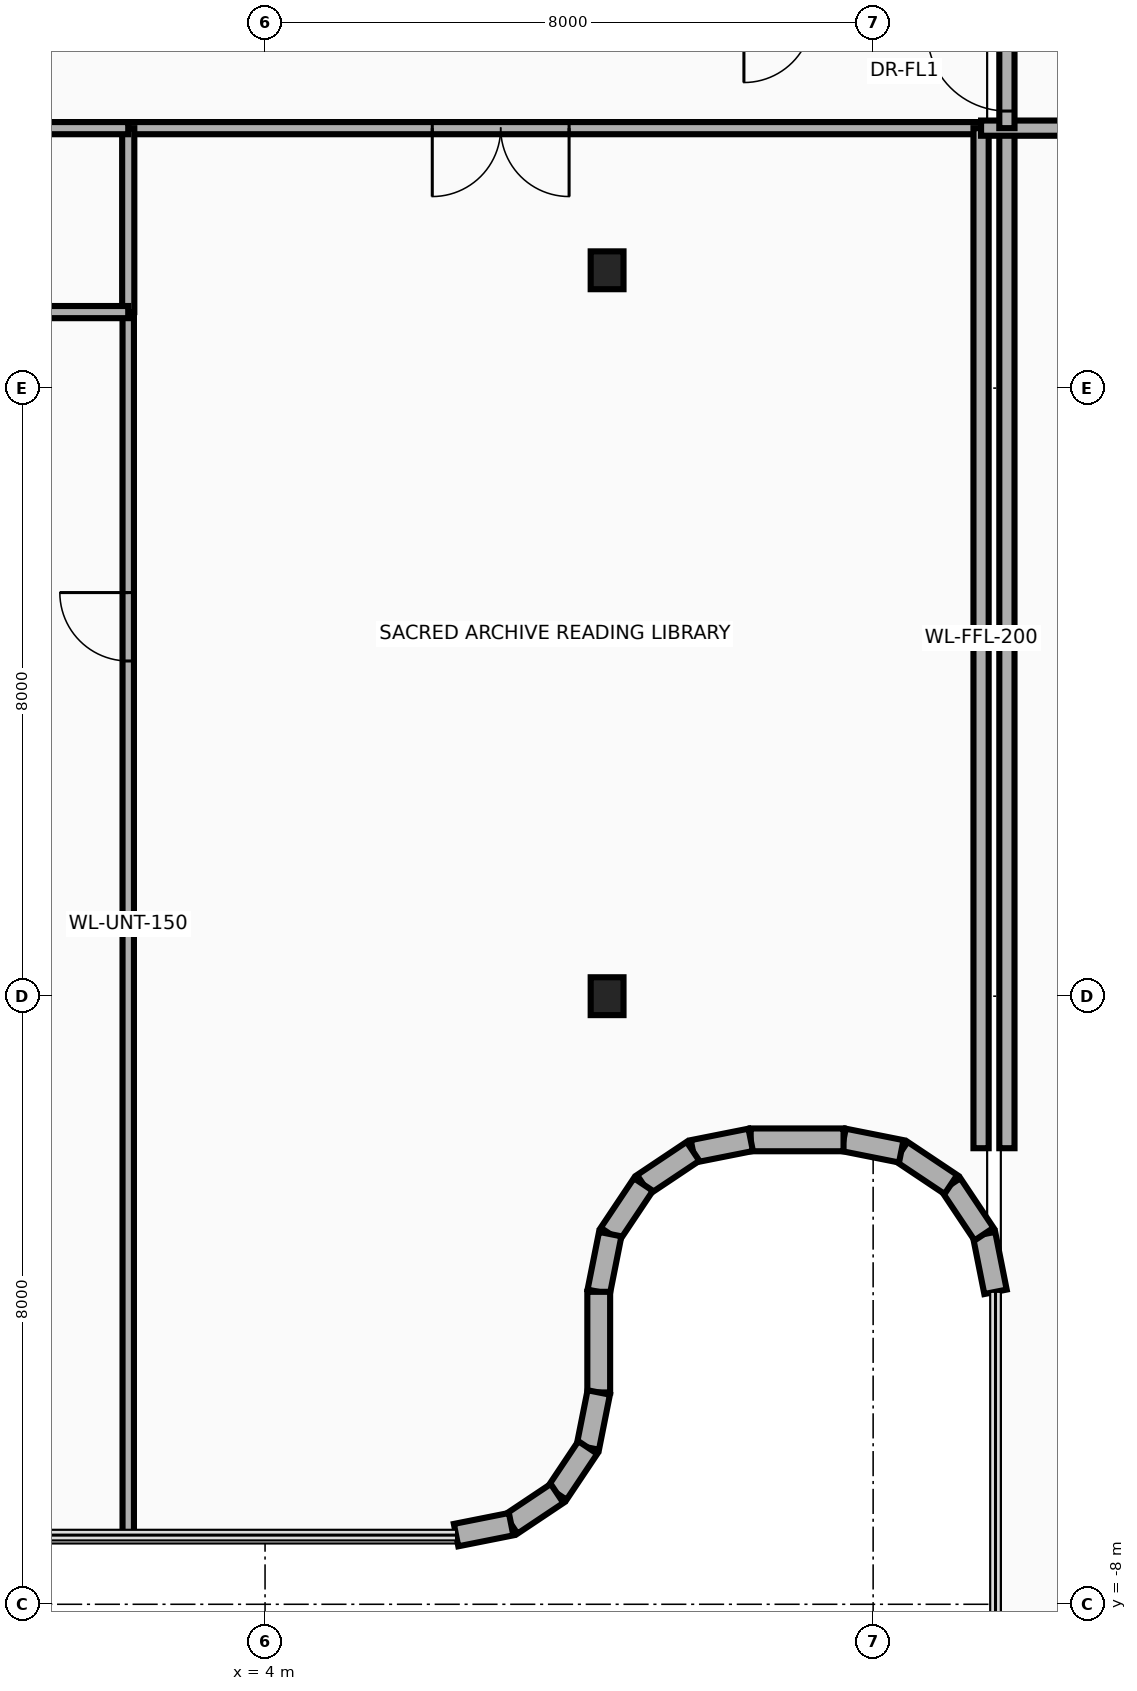
"""IFC4 building model, lengths in metres.
Left out: names, types, materials, properties, quantities, classifications, styles, units other than length and angle.
Written with IfcOpenShell. Run it as: python <this file> out.ifc"""

import sys

from ifc_helpers import new_model, si_unit, direction, frame, frame_2d, origin, origin_2d, place, context, subcontext, project, spatial, rectangle, i_section, extrude, source, transform, mapped, element, fill, save


model = new_model("IFC4")
c1 = context("Model", 3, precision=1e-05, world=origin(), true_north=direction((0.0, 1.0)))
c2 = subcontext(c1, "Body", "Model", "MODEL_VIEW")
j1 = project(units=[si_unit("LENGTHUNIT", "METRE"), si_unit("PLANEANGLEUNIT", "RADIAN")], contexts=[c1])
p1 = place(None, origin())
s1 = spatial("IfcSite", under=j1, at=p1, CompositionType="ELEMENT")
p2 = place(p1, origin())
s2 = spatial("IfcBuilding", under=s1, at=p2, CompositionType="ELEMENT")
p3 = place(p2, frame((0.0, 0.0, 184.45)))
s3 = spatial("IfcBuildingStorey", under=s2, at=p3, CompositionType="ELEMENT", Elevation=184.45)
m1 = source(origin(), c2, "Body", "SweptSolid", [
    extrude(i_section(OverallWidth=0.432, OverallDepth=0.498, WebThickness=0.056, FlangeThickness=0.089, at=origin_2d()), origin(), (0.0, 0.0, 1.0), 3.95),
])
for number, where, z_axis, x_axis in (
    (1, (8.5, 0.0, 0.0), (0.0, 0.0, 1.0), (1.0, 0.0, 0.0)),
    (2, (8.5, 9.55, 0.0), (0.0, 0.0, 1.0), (1.0, 0.0, 0.0)),
):
    element("IfcColumn", number, at=place(p3, frame(where, z_axis=z_axis, x_axis=x_axis)), inside=s3, PredefinedType="COLUMN", context=c2, shape_type="MappedRepresentation", body=[
        mapped(m1, transform((0.0, 0.0, 0.0), x_axis=(1.0, 0.0, 0.0), y_axis=(0.0, 1.0, 0.0), z_axis=(0.0, 0.0, 1.0), scale=1.0)),
    ])
p4 = place(p3, frame((13.61, -3.889, 0.0), z_axis=(0.0, 0.0, 1.0), x_axis=(-0.195206365311, 0.98076219082, 0.0)))
e3 = element("IfcWall", 3, at=p4, inside=s3, PredefinedType="SOLIDWALL", context=c2, shape_type="SweptSolid", body=[
    extrude(rectangle(XDim=0.774, YDim=0.3, at=frame_2d((0.387, 0.0))), origin(), (0.0, 0.0, 1.0), 3.63),
])
for number, where, z_axis, x_axis in (
    (4, (13.459, -3.13, 0.0), (0.0, 0.0, 1.0), (-0.556, 0.831, 0.0)),
    (5, (13.023, -2.477, 0.0), (0.0, 0.0, 1.0), (-0.831, 0.556, 0.0)),
):
    element("IfcWall", number, at=place(p3, frame(where, z_axis=z_axis, x_axis=x_axis)), inside=s3, PredefinedType="SOLIDWALL", context=c2, shape_type="SweptSolid", body=[
        extrude(rectangle(XDim=0.785, YDim=0.3, at=frame_2d((0.393, 0.0))), origin(), (0.0, 0.0, 1.0), 3.63),
    ])
p5 = place(p3, frame((12.37, -2.041, 0.0), z_axis=(0.0, 0.0, 1.0), x_axis=(-0.98076219082, 0.195206365311, 0.0)))
e6 = element("IfcWall", 6, at=p5, inside=s3, PredefinedType="SOLIDWALL", context=c2, shape_type="SweptSolid", body=[
    extrude(rectangle(XDim=0.774, YDim=0.3, at=frame_2d((0.387, 0.0))), origin(), (0.0, 0.0, 1.0), 3.63),
])
p6 = place(p3, frame((11.611, -1.89, 0.0), z_axis=(0.0, 0.0, 1.0), x_axis=(-1.0, 0.0, 0.0)))
e7 = element("IfcWall", 7, at=p6, inside=s3, PredefinedType="SOLIDWALL", context=c2, shape_type="SweptSolid", body=[
    extrude(rectangle(XDim=1.222, YDim=0.3, at=frame_2d((0.611, 0.0))), origin(), (0.0, 0.0, 1.0), 3.63),
])
p7 = place(p3, frame((10.389, -1.89, 0.0), z_axis=(0.0, 0.0, 1.0), x_axis=(-0.98076219082, -0.195206365311, 0.0)))
e8 = element("IfcWall", 8, at=p7, inside=s3, PredefinedType="SOLIDWALL", context=c2, shape_type="SweptSolid", body=[
    extrude(rectangle(XDim=0.774, YDim=0.3, at=frame_2d((0.387, 0.0))), origin(), (0.0, 0.0, 1.0), 3.63),
])
for number, where, z_axis, x_axis in (
    (9, (9.63, -2.041, 0.0), (0.0, 0.0, 1.0), (-0.831, -0.556, 0.0)),
    (10, (8.977, -2.477, 0.0), (0.0, 0.0, 1.0), (-0.556, -0.831, 0.0)),
):
    element("IfcWall", number, at=place(p3, frame(where, z_axis=z_axis, x_axis=x_axis)), inside=s3, PredefinedType="SOLIDWALL", context=c2, shape_type="SweptSolid", body=[
        extrude(rectangle(XDim=0.785, YDim=0.3, at=frame_2d((0.393, 0.0))), origin(), (0.0, 0.0, 1.0), 2.615),
    ])
p8 = place(p3, frame((8.541, -3.13, 0.0), z_axis=(0.0, 0.0, 1.0), x_axis=(-0.195206365311, -0.98076219082, 0.0)))
e11 = element("IfcWall", 11, at=p8, inside=s3, PredefinedType="SOLIDWALL", context=c2, shape_type="SweptSolid", body=[
    extrude(rectangle(XDim=0.774, YDim=0.3, at=frame_2d((0.387, 0.0))), origin(), (0.0, 0.0, 1.0), 2.615),
])
p9 = place(p3, frame((8.39, -3.889, 0.0), z_axis=(0.0, 0.0, 1.0), x_axis=(0.0, -1.0, 0.0)))
e12 = element("IfcWall", 12, at=p9, inside=s3, PredefinedType="SOLIDWALL", context=c2, shape_type="SweptSolid", body=[
    extrude(rectangle(XDim=1.324, YDim=0.3, at=frame_2d((0.662, 0.0))), origin(), (0.0, 0.0, 1.0), 2.615),
])
p10 = place(p3, frame((8.39, -5.213, 0.0), z_axis=(0.0, 0.0, 1.0), x_axis=(-0.194780446724, -0.980846867546, 0.0)))
e13 = element("IfcWall", 13, at=p10, inside=s3, PredefinedType="SOLIDWALL", context=c2, shape_type="SweptSolid", body=[
    extrude(rectangle(XDim=0.738, YDim=0.3, at=frame_2d((0.369, 0.0))), origin(), (0.0, 0.0, 1.0), 2.615),
])
p11 = place(p3, frame((8.246, -5.937, 0.0), z_axis=(0.0, 0.0, 1.0), x_axis=(-0.555784030735, -0.83132671747, 0.0)))
e14 = element("IfcWall", 14, at=p11, inside=s3, PredefinedType="SOLIDWALL", context=c2, shape_type="SweptSolid", body=[
    extrude(rectangle(XDim=0.728, YDim=0.3, at=frame_2d((0.364, 0.0))), origin(), (0.0, 0.0, 1.0), 2.615),
])
p12 = place(p3, frame((7.842, -6.542, 0.0), z_axis=(0.0, 0.0, 1.0), x_axis=(-0.831378135196, -0.555707113792, 0.0)))
e15 = element("IfcWall", 15, at=p12, inside=s3, PredefinedType="SOLIDWALL", context=c2, shape_type="SweptSolid", body=[
    extrude(rectangle(XDim=0.727, YDim=0.3, at=frame_2d((0.364, 0.0))), origin(), (0.0, 0.0, 1.0), 3.63),
])
p13 = place(p3, frame((7.237, -6.946, 0.0), z_axis=(0.0, 0.0, 1.0), x_axis=(-0.980783640462, -0.195098566376, 0.0)))
e16 = element("IfcWall", 16, at=p13, inside=s3, PredefinedType="SOLIDWALL", context=c2, shape_type="SweptSolid", body=[
    extrude(rectangle(XDim=0.738, YDim=0.3, at=frame_2d((0.369, 0.0))), origin(), (0.0, 0.0, 1.0), 3.076),
])
p14 = place(p3, frame((2.2, 11.42, 0.0), z_axis=(0.0, 0.0, 1.0), x_axis=(1.0, 0.0, 0.0)))
e17 = element("IfcWall", 17, at=p14, inside=s3, PredefinedType="PARTITIONING", context=c2, shape_type="SweptSolid", body=[
    extrude(rectangle(XDim=11.22, YDim=0.16, at=frame_2d((5.61, 0.0))), origin(), (0.0, 0.0, 1.0), 2.615),
])
p15 = place(p14, frame((4.0, 0.0, 0.0)))
e18 = element("IfcOpeningElement", 18, at=p15, cuts=e17, PredefinedType="OPENING", context=c2, shape_type="SweptSolid", body=[
    extrude(rectangle(XDim=1.8, YDim=2.15, at=frame_2d((0.9, 1.075))), frame((0.0, 0.095, 0.0), z_axis=(0.0, -1.0, 0.0), x_axis=(1.0, 0.0, 0.0)), (0.0, 0.0, 1.0), 0.19),
])
for number, where, z_axis, x_axis in (
    (19, (13.42, -2.0, 0.0), (0.0, 0.0, 1.0), (0.0, 1.0, 0.0)),
    (20, (13.76, -2.0, 0.0), (0.0, 0.0, 1.0), (0.0, 1.0, 0.0)),
):
    element("IfcWall", number, at=place(p3, frame(where, z_axis=z_axis, x_axis=x_axis)), inside=s3, PredefinedType="PARTITIONING", context=c2, shape_type="SweptSolid", body=[
        extrude(rectangle(XDim=13.42, YDim=0.2, at=frame_2d((6.71, 0.0))), origin(), (0.0, 0.0, 1.0), 2.665),
    ])
p16 = place(p3, frame((2.2, -7.09, 0.0), z_axis=(0.0, 0.0, 1.0), x_axis=(0.0, 1.0, 0.0)))
e21 = element("IfcWall", 21, at=p16, inside=s3, PredefinedType="PARTITIONING", context=c2, shape_type="SweptSolid", body=[
    extrude(rectangle(XDim=16.09, YDim=0.15, at=frame_2d((8.045, 0.0))), origin(), (0.0, 0.0, 1.0), 2.665),
])
p17 = place(p16, frame((11.5, 0.0, 0.0)))
e22 = element("IfcOpeningElement", 22, at=p17, cuts=e21, PredefinedType="OPENING", context=c2, shape_type="SweptSolid", body=[
    extrude(rectangle(XDim=0.9, YDim=2.1, at=frame_2d((0.45, 1.05))), frame((0.0, 0.09, 0.0), z_axis=(0.0, -1.0, 0.0), x_axis=(1.0, 0.0, 0.0)), (0.0, 0.0, 1.0), 0.18),
])
p18 = place(p3, frame((2.2, 9.0, 0.0), z_axis=(0.0, 0.0, 1.0), x_axis=(0.0, 1.0, 0.0)))
e23 = element("IfcWall", 23, at=p18, inside=s3, PredefinedType="PARTITIONING", context=c2, shape_type="SweptSolid", body=[
    extrude(rectangle(XDim=2.42, YDim=0.16, at=frame_2d((1.21, 0.0))), origin(), (0.0, 0.0, 1.0), 2.665),
])
p19 = place(p3, frame((-2.2, 9.0, 0.0), z_axis=(0.0, 0.0, 1.0), x_axis=(1.0, 0.0, 0.0)))
e24 = element("IfcWall", 24, at=p19, inside=s3, PredefinedType="PARTITIONING", context=c2, shape_type="SweptSolid", body=[
    extrude(rectangle(XDim=4.4, YDim=0.16, at=frame_2d((2.2, 0.0))), origin(), (0.0, 0.0, 1.0), 3.63),
])
p20 = place(p3, frame((-2.2, 11.42, 0.0), z_axis=(0.0, 0.0, 1.0), x_axis=(1.0, 0.0, 0.0)))
e25 = element("IfcWall", 25, at=p20, inside=s3, PredefinedType="PARTITIONING", context=c2, shape_type="SweptSolid", body=[
    extrude(rectangle(XDim=4.4, YDim=0.16, at=frame_2d((2.2, 0.0))), origin(), (0.0, 0.0, 1.0), 3.63),
])
p21 = place(p20, frame((0.3, 0.0, 0.0)))
e26 = element("IfcOpeningElement", 26, at=p21, cuts=e25, PredefinedType="OPENING", context=c2, shape_type="SweptSolid", body=[
    extrude(rectangle(XDim=0.85, YDim=2.1, at=frame_2d((0.425, 1.05))), frame((0.0, 0.095, 0.0), z_axis=(0.0, -1.0, 0.0), x_axis=(1.0, 0.0, 0.0)), (0.0, 0.0, 1.0), 0.19),
])
p22 = place(p20, frame((2.45, 0.0, 0.0)))
e27 = element("IfcOpeningElement", 27, at=p22, cuts=e25, PredefinedType="OPENING", context=c2, shape_type="SweptSolid", body=[
    extrude(rectangle(XDim=0.85, YDim=2.1, at=frame_2d((0.425, 1.05))), frame((0.0, 0.095, 0.0), z_axis=(0.0, -1.0, 0.0), x_axis=(1.0, 0.0, 0.0)), (0.0, 0.0, 1.0), 0.19),
])
p23 = place(p3, frame((13.42, 11.42, 0.0), z_axis=(0.0, 0.0, 1.0), x_axis=(1.0, 0.0, 0.0)))
e28 = element("IfcWall", 28, at=p23, inside=s3, PredefinedType="PARTITIONING", context=c2, shape_type="SweptSolid", body=[
    extrude(rectangle(XDim=1.98, YDim=0.2, at=frame_2d((0.99, 0.0))), origin(), (0.0, 0.0, 1.0), 3.004),
])
p24 = place(p3, frame((13.76, 11.42, 0.0), z_axis=(0.0, 0.0, 1.0), x_axis=(0.0, 1.0, 0.0)))
e29 = element("IfcWall", 29, at=p24, inside=s3, PredefinedType="PARTITIONING", context=c2, shape_type="SweptSolid", body=[
    extrude(rectangle(XDim=1.5, YDim=0.2, at=frame_2d((0.75, 0.0))), origin(), (0.0, 0.0, 1.0), 3.004),
])
p25 = place(p24, frame((0.225, 0.0, 0.0)))
e30 = element("IfcOpeningElement", 30, at=p25, cuts=e29, PredefinedType="OPENING", context=c2, shape_type="SweptSolid", body=[
    extrude(rectangle(XDim=1.05, YDim=2.15, at=frame_2d((0.525, 1.075))), frame((0.0, 0.115, 0.0), z_axis=(0.0, -1.0, 0.0), x_axis=(1.0, 0.0, 0.0)), (0.0, 0.0, 1.0), 0.23),
])
p26 = place(p15, frame((1.8, 0.0, 0.0), z_axis=(0.0, 0.0, 1.0), x_axis=(-1.0, 0.0, 0.0)))
e31 = element("IfcDoor", 31, at=p26, inside=s3, OperationType="DOUBLE_DOOR_SINGLE_SWING", PredefinedType="DOOR", context=c2, shape_type="SweptSolid", body=[
    extrude(rectangle(XDim=1.8, YDim=2.15, at=frame_2d((0.9, 1.075))), frame((0.0, 0.025, 0.0), z_axis=(0.0, -1.0, 0.0), x_axis=(1.0, 0.0, 0.0)), (0.0, 0.0, 1.0), 0.05),
])
fill(e18, e31)
p27 = place(p17, origin())
e32 = element("IfcDoor", 32, at=p27, inside=s3, OperationType="SINGLE_SWING_RIGHT", PredefinedType="DOOR", context=c2, shape_type="SweptSolid", body=[
    extrude(rectangle(XDim=0.9, YDim=2.1, at=frame_2d((0.45, 1.05))), frame((0.0, 0.025, 0.0), z_axis=(0.0, -1.0, 0.0), x_axis=(1.0, 0.0, 0.0)), (0.0, 0.0, 1.0), 0.05),
])
fill(e22, e32)
p28 = place(p25, origin())
e33 = element("IfcDoor", 33, at=p28, inside=s3, OperationType="SINGLE_SWING_LEFT", PredefinedType="DOOR", context=c2, shape_type="SweptSolid", body=[
    extrude(rectangle(XDim=1.05, YDim=2.15, at=frame_2d((0.525, 1.075))), frame((0.0, 0.025, 0.0), z_axis=(0.0, -1.0, 0.0), x_axis=(1.0, 0.0, 0.0)), (0.0, 0.0, 1.0), 0.05),
])
fill(e30, e33)
save(model, sys.argv[1])
